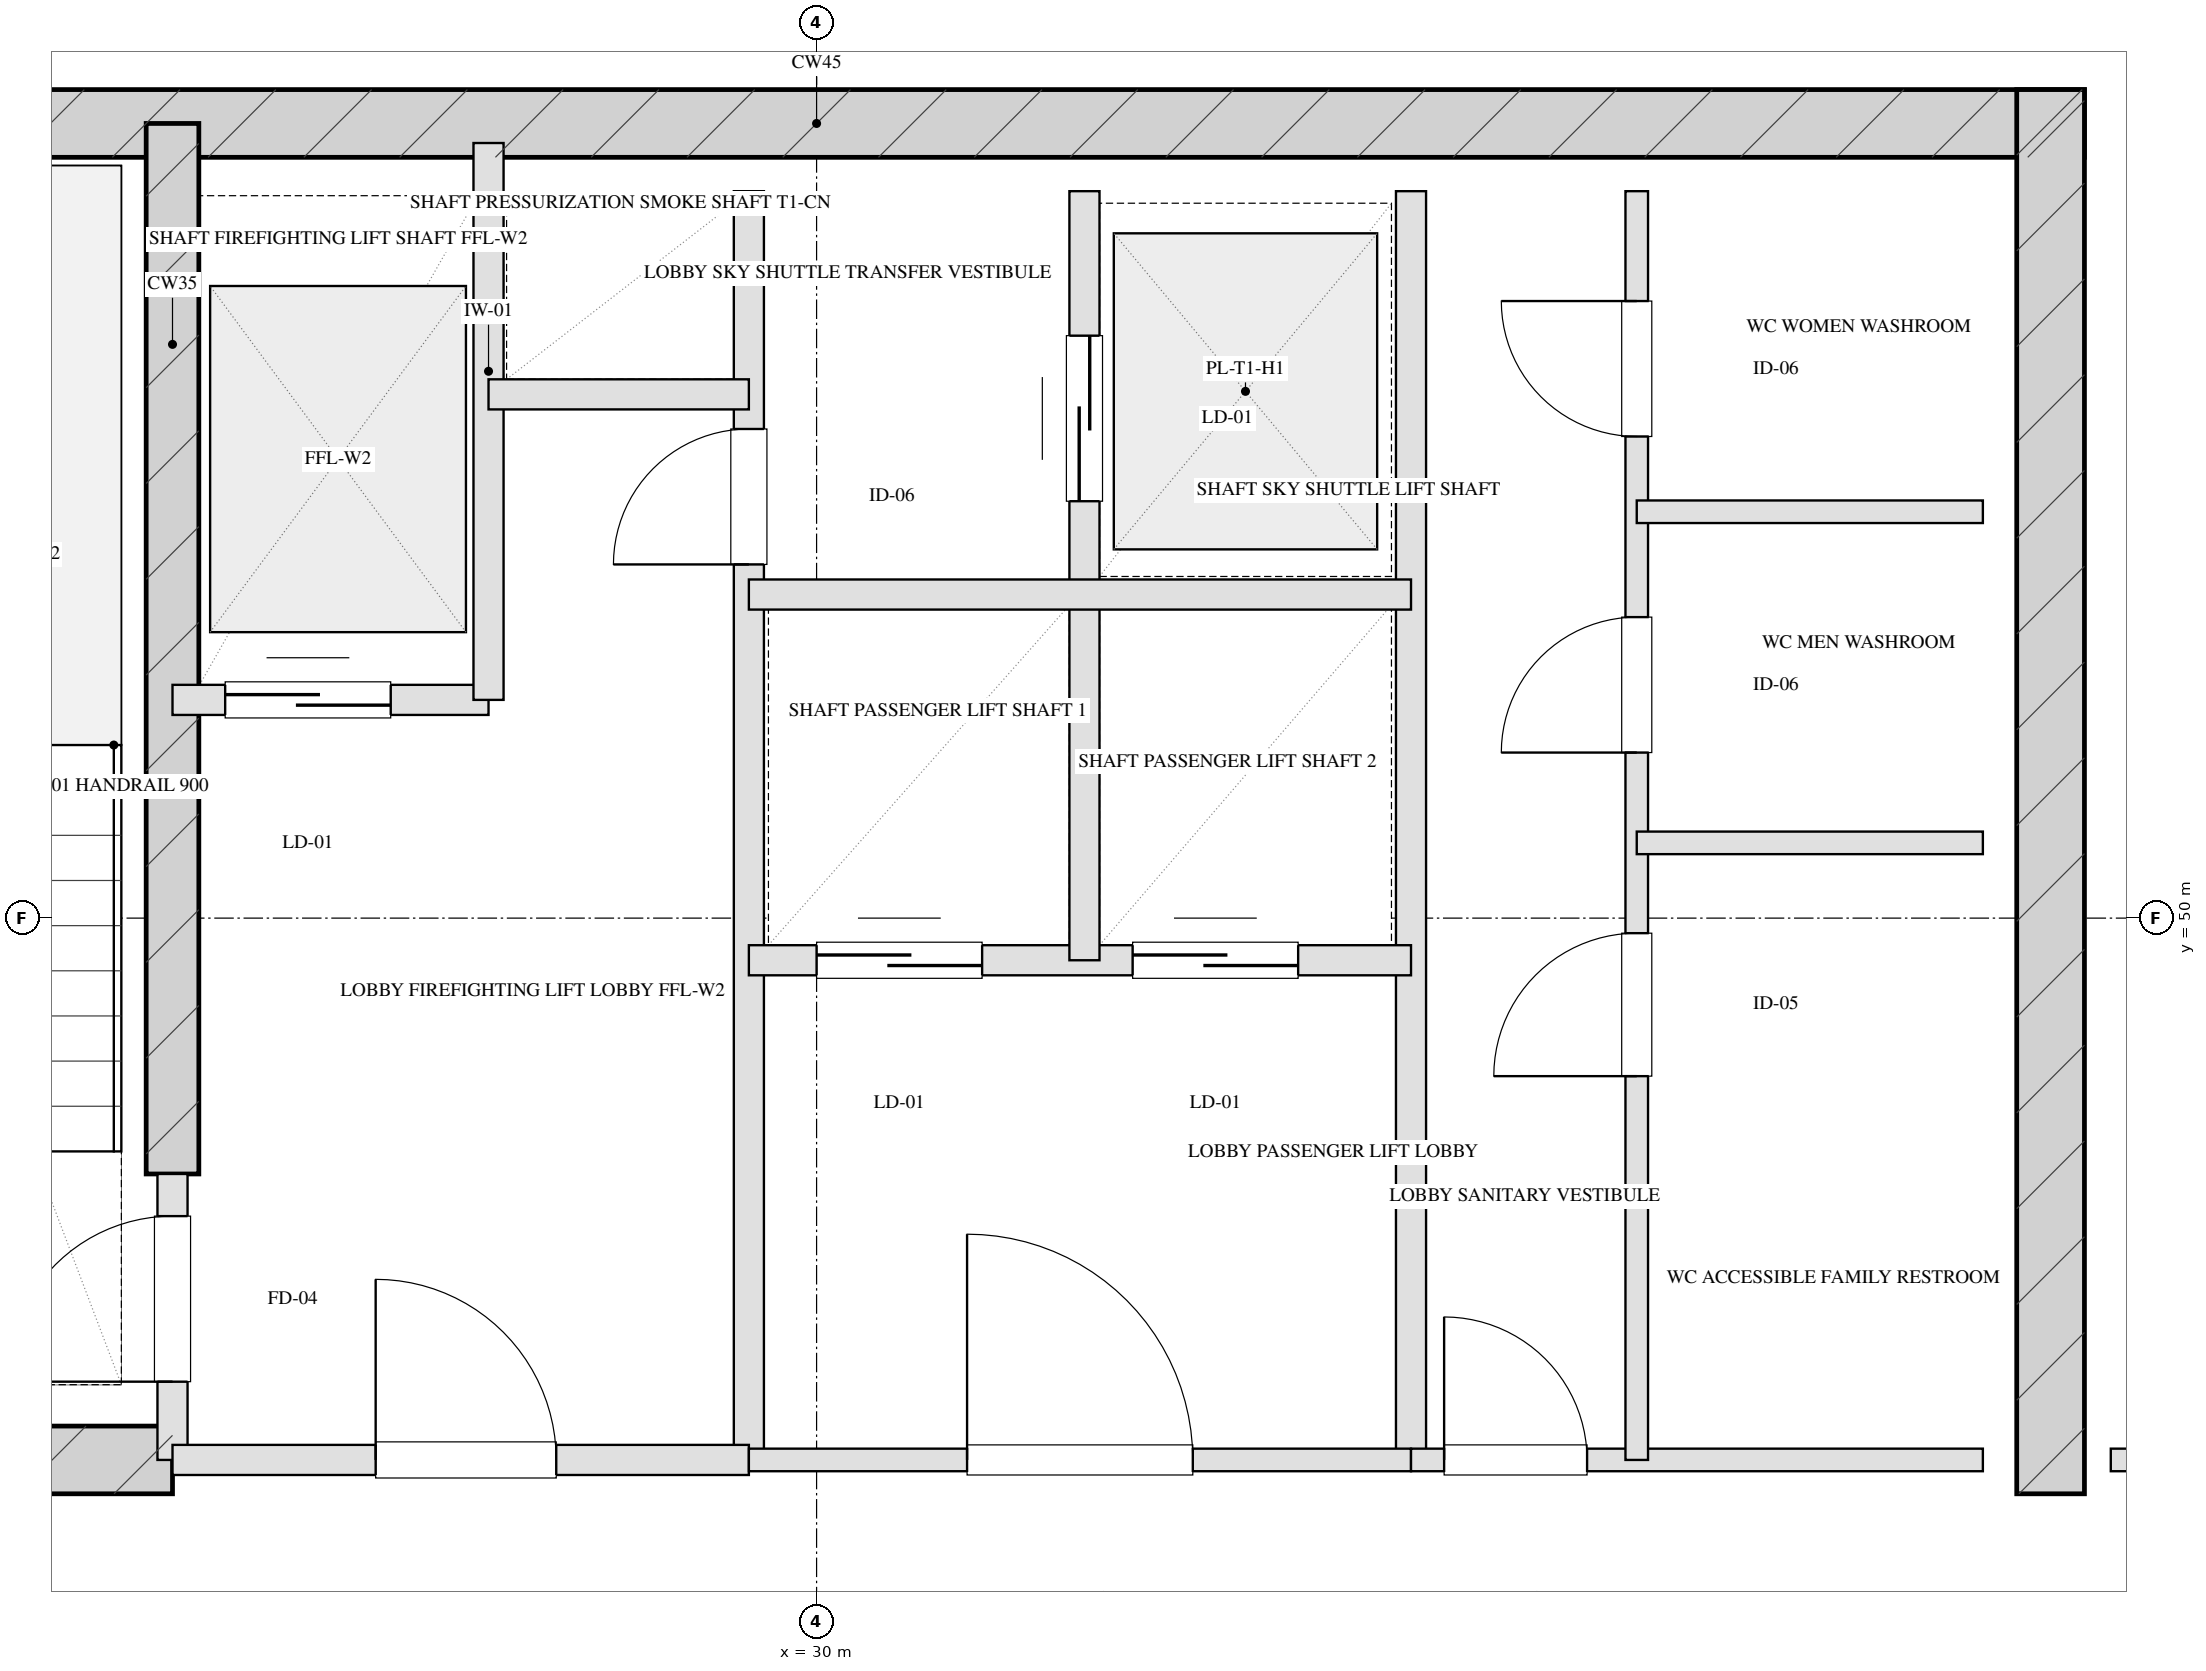
"""IFC4 building model, lengths in metres.
Left out: names, types, materials, properties, quantities, classifications, styles, units other than length and angle.
Written with IfcOpenShell. Run it as: python <this file> out.ifc"""

import sys

from ifc_helpers import new_model, si_unit, direction, frame, frame_2d, origin, place, context, subcontext, project, spatial, rectangle, extrude, element, fill, save


model = new_model("IFC4")
c1 = context("Model", 3, precision=1e-05, world=origin(), true_north=direction((0.0, 1.0)))
c2 = subcontext(c1, "Body", "Model", "MODEL_VIEW")
j1 = project(units=[si_unit("LENGTHUNIT", "METRE"), si_unit("PLANEANGLEUNIT", "RADIAN")], contexts=[c1])
p1 = place(None, origin())
s1 = spatial("IfcSite", under=j1, at=p1, CompositionType="ELEMENT")
p2 = place(p1, origin())
s2 = spatial("IfcBuilding", under=s1, at=p2, CompositionType="ELEMENT")
p3 = place(p2, frame((0.0, 0.0, 216.2)))
s3 = spatial("IfcBuildingStorey", under=s2, at=p3, CompositionType="ELEMENT", Elevation=216.2)
p4 = place(p3, frame((21.575, 55.28, 0.0), z_axis=(0.0, 0.0, 1.0), x_axis=(1.0, 0.0, 0.0)))
e1 = element("IfcWall", 1, at=p4, inside=s3, PredefinedType="SHEAR", context=c2, shape_type="SweptSolid", body=[
    extrude(rectangle(XDim=16.85, YDim=0.45, at=frame_2d((8.425, 0.0))), origin(), (0.0, 0.0, 1.0), 3.45),
])
p5 = place(p3, frame((38.2, 46.175, 0.0), z_axis=(0.0, 0.0, 1.0), x_axis=(0.0, 1.0, 0.0)))
e2 = element("IfcWall", 2, at=p5, inside=s3, PredefinedType="SHEAR", context=c2, shape_type="SweptSolid", body=[
    extrude(rectangle(XDim=9.33, YDim=0.45, at=frame_2d((4.665, 0.0))), origin(), (0.0, 0.0, 1.0), 3.45),
])
p6 = place(p3, frame((25.72, 48.3, 0.0), z_axis=(0.0, 0.0, 1.0), x_axis=(0.0, 1.0, 0.0)))
e3 = element("IfcWall", 3, at=p6, inside=s3, PredefinedType="SHEAR", context=c2, shape_type="SweptSolid", body=[
    extrude(rectangle(XDim=6.98, YDim=0.35, at=frame_2d((3.49, 0.0))), origin(), (0.0, 0.0, 1.0), 3.45),
])
p7 = place(p3, frame((21.575, 46.4, 0.0), z_axis=(0.0, 0.0, 1.0), x_axis=(1.0, 0.0, 0.0)))
e4 = element("IfcWall", 4, at=p7, inside=s3, PredefinedType="SHEAR", context=c2, shape_type="SweptSolid", body=[
    extrude(rectangle(XDim=4.145, YDim=0.45, at=frame_2d((2.073, 0.0))), origin(), (0.0, 0.0, 1.0), 3.45),
])
p8 = place(p3, frame((25.72, 46.4, 0.0), z_axis=(0.0, 0.0, 1.0), x_axis=(0.0, 1.0, 0.0)))
e5 = element("IfcWall", 5, at=p8, inside=s3, PredefinedType="PARTITIONING", context=c2, shape_type="SweptSolid", body=[
    extrude(rectangle(XDim=1.9, YDim=0.2, at=frame_2d((0.95, 0.0))), origin(), (0.0, 0.0, 1.0), 3.155),
])
p9 = place(p8, frame((0.52, 0.0, 0.0)))
e6 = element("IfcOpeningElement", 6, at=p9, cuts=e5, PredefinedType="OPENING", context=c2, shape_type="SweptSolid", body=[
    extrude(rectangle(XDim=1.1, YDim=2.05, at=frame_2d((0.55, 1.025))), frame((0.0, 0.11, 0.0), z_axis=(0.0, -1.0, 0.0), x_axis=(1.0, 0.0, 0.0)), (0.0, 0.0, 1.0), 0.22),
])
p10 = place(p3, frame((29.55, 46.4, 0.0), z_axis=(0.0, 0.0, 1.0), x_axis=(0.0, 1.0, 0.0)))
e7 = element("IfcWall", 7, at=p10, inside=s3, PredefinedType="PARTITIONING", context=c2, shape_type="SweptSolid", body=[
    extrude(rectangle(XDim=8.43, YDim=0.2, at=frame_2d((4.215, 0.0))), origin(), (0.0, 0.0, 1.0), 3.155),
])
p11 = place(p10, frame((5.95, 0.0, 0.0)))
e8 = element("IfcOpeningElement", 8, at=p11, cuts=e7, PredefinedType="OPENING", context=c2, shape_type="SweptSolid", body=[
    extrude(rectangle(XDim=0.9, YDim=2.05, at=frame_2d((0.45, 1.025))), frame((0.0, 0.11, 0.0), z_axis=(0.0, -1.0, 0.0), x_axis=(1.0, 0.0, 0.0)), (0.0, 0.0, 1.0), 0.22),
])
p12 = place(p3, frame((25.72, 46.4, 0.0), z_axis=(0.0, 0.0, 1.0), x_axis=(1.0, 0.0, 0.0)))
e9 = element("IfcWall", 9, at=p12, inside=s3, PredefinedType="PARTITIONING", context=c2, shape_type="SweptSolid", body=[
    extrude(rectangle(XDim=3.83, YDim=0.2, at=frame_2d((1.915, 0.0))), origin(), (0.0, 0.0, 1.0), 3.155),
])
p13 = place(p12, frame((1.35, 0.0, 0.0)))
e10 = element("IfcOpeningElement", 10, at=p13, cuts=e9, PredefinedType="OPENING", context=c2, shape_type="SweptSolid", body=[
    extrude(rectangle(XDim=1.2, YDim=2.05, at=frame_2d((0.6, 1.025))), frame((0.0, 0.11, 0.0), z_axis=(0.0, -1.0, 0.0), x_axis=(1.0, 0.0, 0.0)), (0.0, 0.0, 1.0), 0.22),
])
p14 = place(p3, frame((25.72, 51.45, 0.0), z_axis=(0.0, 0.0, 1.0), x_axis=(1.0, 0.0, 0.0)))
e11 = element("IfcWall", 11, at=p14, inside=s3, PredefinedType="PARTITIONING", context=c2, shape_type="SweptSolid", body=[
    extrude(rectangle(XDim=2.1, YDim=0.2, at=frame_2d((1.05, 0.0))), origin(), (0.0, 0.0, 1.0), 3.155),
])
p15 = place(p14, frame((0.35, 0.0, 0.0)))
e12 = element("IfcOpeningElement", 12, at=p15, cuts=e11, PredefinedType="OPENING", context=c2, shape_type="SweptSolid", body=[
    extrude(rectangle(XDim=1.1, YDim=2.05, at=frame_2d((0.55, 1.025))), frame((0.0, 0.11, 0.0), z_axis=(0.0, -1.0, 0.0), x_axis=(1.0, 0.0, 0.0)), (0.0, 0.0, 1.0), 0.22),
])
p16 = place(p3, frame((27.82, 51.45, 0.0), z_axis=(0.0, 0.0, 1.0), x_axis=(0.0, 1.0, 0.0)))
e13 = element("IfcWall", 13, at=p16, inside=s3, PredefinedType="PARTITIONING", context=c2, shape_type="SweptSolid", body=[
    extrude(rectangle(XDim=3.7, YDim=0.2, at=frame_2d((1.85, 0.0))), origin(), (0.0, 0.0, 1.0), 3.155),
])
p17 = place(p3, frame((27.82, 53.48, 0.0), z_axis=(0.0, 0.0, 1.0), x_axis=(1.0, 0.0, 0.0)))
e14 = element("IfcWall", 14, at=p17, inside=s3, PredefinedType="PARTITIONING", context=c2, shape_type="SweptSolid", body=[
    extrude(rectangle(XDim=1.73, YDim=0.2, at=frame_2d((0.865, 0.0))), origin(), (0.0, 0.0, 1.0), 3.155),
])
p18 = place(p3, frame((33.95, 46.4, 0.0), z_axis=(0.0, 0.0, 1.0), x_axis=(0.0, 1.0, 0.0)))
e15 = element("IfcWall", 15, at=p18, inside=s3, PredefinedType="PARTITIONING", context=c2, shape_type="SweptSolid", body=[
    extrude(rectangle(XDim=8.43, YDim=0.2, at=frame_2d((4.215, 0.0))), origin(), (0.0, 0.0, 1.0), 3.155),
])
p19 = place(p3, frame((29.55, 46.4, 0.0), z_axis=(0.0, 0.0, 1.0), x_axis=(1.0, 0.0, 0.0)))
e16 = element("IfcWall", 16, at=p19, inside=s3, PredefinedType="PARTITIONING", context=c2, shape_type="SweptSolid", body=[
    extrude(rectangle(XDim=4.4, YDim=0.15, at=frame_2d((2.2, 0.0))), origin(), (0.0, 0.0, 1.0), 3.155),
])
p20 = place(p19, frame((1.45, 0.0, 0.0)))
e17 = element("IfcOpeningElement", 17, at=p20, cuts=e16, PredefinedType="OPENING", context=c2, shape_type="SweptSolid", body=[
    extrude(rectangle(XDim=1.5, YDim=2.05, at=frame_2d((0.75, 1.025))), frame((0.0, 0.085, 0.0), z_axis=(0.0, -1.0, 0.0), x_axis=(1.0, 0.0, 0.0)), (0.0, 0.0, 1.0), 0.17),
])
p21 = place(p3, frame((29.55, 49.72, 0.0), z_axis=(0.0, 0.0, 1.0), x_axis=(1.0, 0.0, 0.0)))
e18 = element("IfcWall", 18, at=p21, inside=s3, PredefinedType="PARTITIONING", context=c2, shape_type="SweptSolid", body=[
    extrude(rectangle(XDim=4.4, YDim=0.2, at=frame_2d((2.2, 0.0))), origin(), (0.0, 0.0, 1.0), 3.155),
])
p22 = place(p21, frame((0.45, 0.0, 0.0)))
e19 = element("IfcOpeningElement", 19, at=p22, cuts=e18, PredefinedType="OPENING", context=c2, shape_type="SweptSolid", body=[
    extrude(rectangle(XDim=1.1, YDim=2.05, at=frame_2d((0.55, 1.025))), frame((0.0, 0.11, 0.0), z_axis=(0.0, -1.0, 0.0), x_axis=(1.0, 0.0, 0.0)), (0.0, 0.0, 1.0), 0.22),
])
p23 = place(p21, frame((2.55, 0.0, 0.0)))
e20 = element("IfcOpeningElement", 20, at=p23, cuts=e18, PredefinedType="OPENING", context=c2, shape_type="SweptSolid", body=[
    extrude(rectangle(XDim=1.1, YDim=2.05, at=frame_2d((0.55, 1.025))), frame((0.0, 0.11, 0.0), z_axis=(0.0, -1.0, 0.0), x_axis=(1.0, 0.0, 0.0)), (0.0, 0.0, 1.0), 0.22),
])
p24 = place(p3, frame((31.78, 49.72, 0.0), z_axis=(0.0, 0.0, 1.0), x_axis=(0.0, 1.0, 0.0)))
e21 = element("IfcWall", 21, at=p24, inside=s3, PredefinedType="PARTITIONING", context=c2, shape_type="SweptSolid", body=[
    extrude(rectangle(XDim=5.11, YDim=0.2, at=frame_2d((2.555, 0.0))), origin(), (0.0, 0.0, 1.0), 3.155),
])
p25 = place(p24, frame((3.05, 0.0, 0.0)))
e22 = element("IfcOpeningElement", 22, at=p25, cuts=e21, PredefinedType="OPENING", context=c2, shape_type="SweptSolid", body=[
    extrude(rectangle(XDim=1.1, YDim=2.05, at=frame_2d((0.55, 1.025))), frame((0.0, 0.11, 0.0), z_axis=(0.0, -1.0, 0.0), x_axis=(1.0, 0.0, 0.0)), (0.0, 0.0, 1.0), 0.22),
])
p26 = place(p3, frame((29.55, 52.15, 0.0), z_axis=(0.0, 0.0, 1.0), x_axis=(1.0, 0.0, 0.0)))
e23 = element("IfcWall", 23, at=p26, inside=s3, PredefinedType="PARTITIONING", context=c2, shape_type="SweptSolid", body=[
    extrude(rectangle(XDim=4.4, YDim=0.2, at=frame_2d((2.2, 0.0))), origin(), (0.0, 0.0, 1.0), 3.155),
])
p27 = place(p3, frame((33.95, 46.4, 0.0), z_axis=(0.0, 0.0, 1.0), x_axis=(1.0, 0.0, 0.0)))
e24 = element("IfcWall", 24, at=p27, inside=s3, PredefinedType="PARTITIONING", context=c2, shape_type="SweptSolid", body=[
    extrude(rectangle(XDim=3.8, YDim=0.15, at=frame_2d((1.9, 0.0))), origin(), (0.0, 0.0, 1.0), 3.155),
])
p28 = place(p27, frame((0.22, 0.0, 0.0)))
e25 = element("IfcOpeningElement", 25, at=p28, cuts=e24, PredefinedType="OPENING", context=c2, shape_type="SweptSolid", body=[
    extrude(rectangle(XDim=0.95, YDim=2.05, at=frame_2d((0.475, 1.025))), frame((0.0, 0.085, 0.0), z_axis=(0.0, -1.0, 0.0), x_axis=(1.0, 0.0, 0.0)), (0.0, 0.0, 1.0), 0.17),
])
p29 = place(p3, frame((35.45, 46.4, 0.0), z_axis=(0.0, 0.0, 1.0), x_axis=(0.0, 1.0, 0.0)))
e26 = element("IfcWall", 26, at=p29, inside=s3, PredefinedType="PARTITIONING", context=c2, shape_type="SweptSolid", body=[
    extrude(rectangle(XDim=8.43, YDim=0.15, at=frame_2d((4.215, 0.0))), origin(), (0.0, 0.0, 1.0), 2.745),
])
p30 = place(p29, frame((2.55, 0.0, 0.0)))
e27 = element("IfcOpeningElement", 27, at=p30, cuts=e26, PredefinedType="OPENING", context=c2, shape_type="SweptSolid", body=[
    extrude(rectangle(XDim=0.95, YDim=2.05, at=frame_2d((0.475, 1.025))), frame((0.0, 0.085, 0.0), z_axis=(0.0, -1.0, 0.0), x_axis=(1.0, 0.0, 0.0)), (0.0, 0.0, 1.0), 0.17),
])
p31 = place(p29, frame((4.7, 0.0, 0.0)))
e28 = element("IfcOpeningElement", 28, at=p31, cuts=e26, PredefinedType="OPENING", context=c2, shape_type="SweptSolid", body=[
    extrude(rectangle(XDim=0.9, YDim=2.05, at=frame_2d((0.45, 1.025))), frame((0.0, 0.085, 0.0), z_axis=(0.0, -1.0, 0.0), x_axis=(1.0, 0.0, 0.0)), (0.0, 0.0, 1.0), 0.17),
])
p32 = place(p29, frame((6.8, 0.0, 0.0)))
e29 = element("IfcOpeningElement", 29, at=p32, cuts=e26, PredefinedType="OPENING", context=c2, shape_type="SweptSolid", body=[
    extrude(rectangle(XDim=0.9, YDim=2.05, at=frame_2d((0.45, 1.025))), frame((0.0, 0.085, 0.0), z_axis=(0.0, -1.0, 0.0), x_axis=(1.0, 0.0, 0.0)), (0.0, 0.0, 1.0), 0.17),
])
for number, where, z_axis, x_axis in (
    (30, (35.45, 50.5, 0.0), (0.0, 0.0, 1.0), (1.0, 0.0, 0.0)),
    (31, (35.45, 52.7, 0.0), (0.0, 0.0, 1.0), (1.0, 0.0, 0.0)),
):
    element("IfcWall", number, at=place(p3, frame(where, z_axis=z_axis, x_axis=x_axis)), inside=s3, PredefinedType="PARTITIONING", context=c2, shape_type="SweptSolid", body=[
        extrude(rectangle(XDim=2.3, YDim=0.15, at=frame_2d((1.15, 0.0))), origin(), (0.0, 0.0, 1.0), 3.155),
    ])
p33 = place(p3, frame((38.6, 46.4, 0.0), z_axis=(0.0, 0.0, 1.0), x_axis=(1.0, 0.0, 0.0)))
e32 = element("IfcWall", 32, at=p33, inside=s3, PredefinedType="PARTITIONING", context=c2, shape_type="SweptSolid", body=[
    extrude(rectangle(XDim=8.2, YDim=0.15, at=frame_2d((4.1, 0.0))), origin(), (0.0, 0.0, 1.0), 3.155),
])
p34 = place(p33, frame((3.444, 0.0, 0.0)))
e33 = element("IfcOpeningElement", 33, at=p34, cuts=e32, PredefinedType="OPENING", context=c2, shape_type="SweptSolid", body=[
    extrude(rectangle(XDim=1.0, YDim=2.05, at=frame_2d((0.5, 1.025))), frame((0.0, 0.085, 0.0), z_axis=(0.0, -1.0, 0.0), x_axis=(1.0, 0.0, 0.0)), (0.0, 0.0, 1.0), 0.17),
])
p35 = place(p9, origin())
e34 = element("IfcDoor", 34, at=p35, inside=s3, OperationType="SINGLE_SWING_LEFT", PredefinedType="DOOR", context=c2, shape_type="SweptSolid", body=[
    extrude(rectangle(XDim=1.1, YDim=2.05, at=frame_2d((0.55, 1.025))), frame((0.0, 0.025, 0.0), z_axis=(0.0, -1.0, 0.0), x_axis=(1.0, 0.0, 0.0)), (0.0, 0.0, 1.0), 0.05),
])
fill(e6, e34)
p36 = place(p11, origin())
e35 = element("IfcDoor", 35, at=p36, inside=s3, OperationType="SINGLE_SWING_LEFT", PredefinedType="DOOR", context=c2, shape_type="SweptSolid", body=[
    extrude(rectangle(XDim=0.9, YDim=2.05, at=frame_2d((0.45, 1.025))), frame((0.0, 0.025, 0.0), z_axis=(0.0, -1.0, 0.0), x_axis=(1.0, 0.0, 0.0)), (0.0, 0.0, 1.0), 0.05),
])
fill(e8, e35)
p37 = place(p13, origin())
e36 = element("IfcDoor", 36, at=p37, inside=s3, OperationType="SINGLE_SWING_LEFT", PredefinedType="DOOR", context=c2, shape_type="SweptSolid", body=[
    extrude(rectangle(XDim=1.2, YDim=2.05, at=frame_2d((0.6, 1.025))), frame((0.0, 0.025, 0.0), z_axis=(0.0, -1.0, 0.0), x_axis=(1.0, 0.0, 0.0)), (0.0, 0.0, 1.0), 0.05),
])
fill(e10, e36)
p38 = place(p15, origin())
e37 = element("IfcDoor", 37, at=p38, inside=s3, OperationType="DOUBLE_DOOR_SLIDING", PredefinedType="DOOR", context=c2, shape_type="SweptSolid", body=[
    extrude(rectangle(XDim=1.1, YDim=2.05, at=frame_2d((0.55, 1.025))), frame((0.0, 0.025, 0.0), z_axis=(0.0, -1.0, 0.0), x_axis=(1.0, 0.0, 0.0)), (0.0, 0.0, 1.0), 0.05),
])
fill(e12, e37)
p39 = place(p20, origin())
e38 = element("IfcDoor", 38, at=p39, inside=s3, OperationType="SINGLE_SWING_LEFT", PredefinedType="DOOR", context=c2, shape_type="SweptSolid", body=[
    extrude(rectangle(XDim=1.5, YDim=2.05, at=frame_2d((0.75, 1.025))), frame((0.0, 0.025, 0.0), z_axis=(0.0, -1.0, 0.0), x_axis=(1.0, 0.0, 0.0)), (0.0, 0.0, 1.0), 0.05),
])
fill(e17, e38)
p40 = place(p22, origin())
e39 = element("IfcDoor", 39, at=p40, inside=s3, OperationType="DOUBLE_DOOR_SLIDING", PredefinedType="DOOR", context=c2, shape_type="SweptSolid", body=[
    extrude(rectangle(XDim=1.1, YDim=2.05, at=frame_2d((0.55, 1.025))), frame((0.0, 0.025, 0.0), z_axis=(0.0, -1.0, 0.0), x_axis=(1.0, 0.0, 0.0)), (0.0, 0.0, 1.0), 0.05),
])
fill(e19, e39)
p41 = place(p23, origin())
e40 = element("IfcDoor", 40, at=p41, inside=s3, OperationType="DOUBLE_DOOR_SLIDING", PredefinedType="DOOR", context=c2, shape_type="SweptSolid", body=[
    extrude(rectangle(XDim=1.1, YDim=2.05, at=frame_2d((0.55, 1.025))), frame((0.0, 0.025, 0.0), z_axis=(0.0, -1.0, 0.0), x_axis=(1.0, 0.0, 0.0)), (0.0, 0.0, 1.0), 0.05),
])
fill(e20, e40)
p42 = place(p25, origin())
e41 = element("IfcDoor", 41, at=p42, inside=s3, OperationType="DOUBLE_DOOR_SLIDING", PredefinedType="DOOR", context=c2, shape_type="SweptSolid", body=[
    extrude(rectangle(XDim=1.1, YDim=2.05, at=frame_2d((0.55, 1.025))), frame((0.0, 0.025, 0.0), z_axis=(0.0, -1.0, 0.0), x_axis=(1.0, 0.0, 0.0)), (0.0, 0.0, 1.0), 0.05),
])
fill(e22, e41)
p43 = place(p28, origin())
e42 = element("IfcDoor", 42, at=p43, inside=s3, OperationType="SINGLE_SWING_LEFT", PredefinedType="DOOR", context=c2, shape_type="SweptSolid", body=[
    extrude(rectangle(XDim=0.95, YDim=2.05, at=frame_2d((0.475, 1.025))), frame((0.0, 0.025, 0.0), z_axis=(0.0, -1.0, 0.0), x_axis=(1.0, 0.0, 0.0)), (0.0, 0.0, 1.0), 0.05),
])
fill(e25, e42)
p44 = place(p30, origin())
e43 = element("IfcDoor", 43, at=p44, inside=s3, OperationType="SINGLE_SWING_LEFT", PredefinedType="DOOR", context=c2, shape_type="SweptSolid", body=[
    extrude(rectangle(XDim=0.95, YDim=2.05, at=frame_2d((0.475, 1.025))), frame((0.0, 0.025, 0.0), z_axis=(0.0, -1.0, 0.0), x_axis=(1.0, 0.0, 0.0)), (0.0, 0.0, 1.0), 0.05),
])
fill(e27, e43)
p45 = place(p31, origin())
e44 = element("IfcDoor", 44, at=p45, inside=s3, OperationType="SINGLE_SWING_LEFT", PredefinedType="DOOR", context=c2, shape_type="SweptSolid", body=[
    extrude(rectangle(XDim=0.9, YDim=2.05, at=frame_2d((0.45, 1.025))), frame((0.0, 0.025, 0.0), z_axis=(0.0, -1.0, 0.0), x_axis=(1.0, 0.0, 0.0)), (0.0, 0.0, 1.0), 0.05),
])
fill(e28, e44)
p46 = place(p32, origin())
e45 = element("IfcDoor", 45, at=p46, inside=s3, OperationType="SINGLE_SWING_RIGHT", PredefinedType="DOOR", context=c2, shape_type="SweptSolid", body=[
    extrude(rectangle(XDim=0.9, YDim=2.05, at=frame_2d((0.45, 1.025))), frame((0.0, 0.025, 0.0), z_axis=(0.0, -1.0, 0.0), x_axis=(1.0, 0.0, 0.0)), (0.0, 0.0, 1.0), 0.05),
])
fill(e29, e45)
save(model, sys.argv[1])
